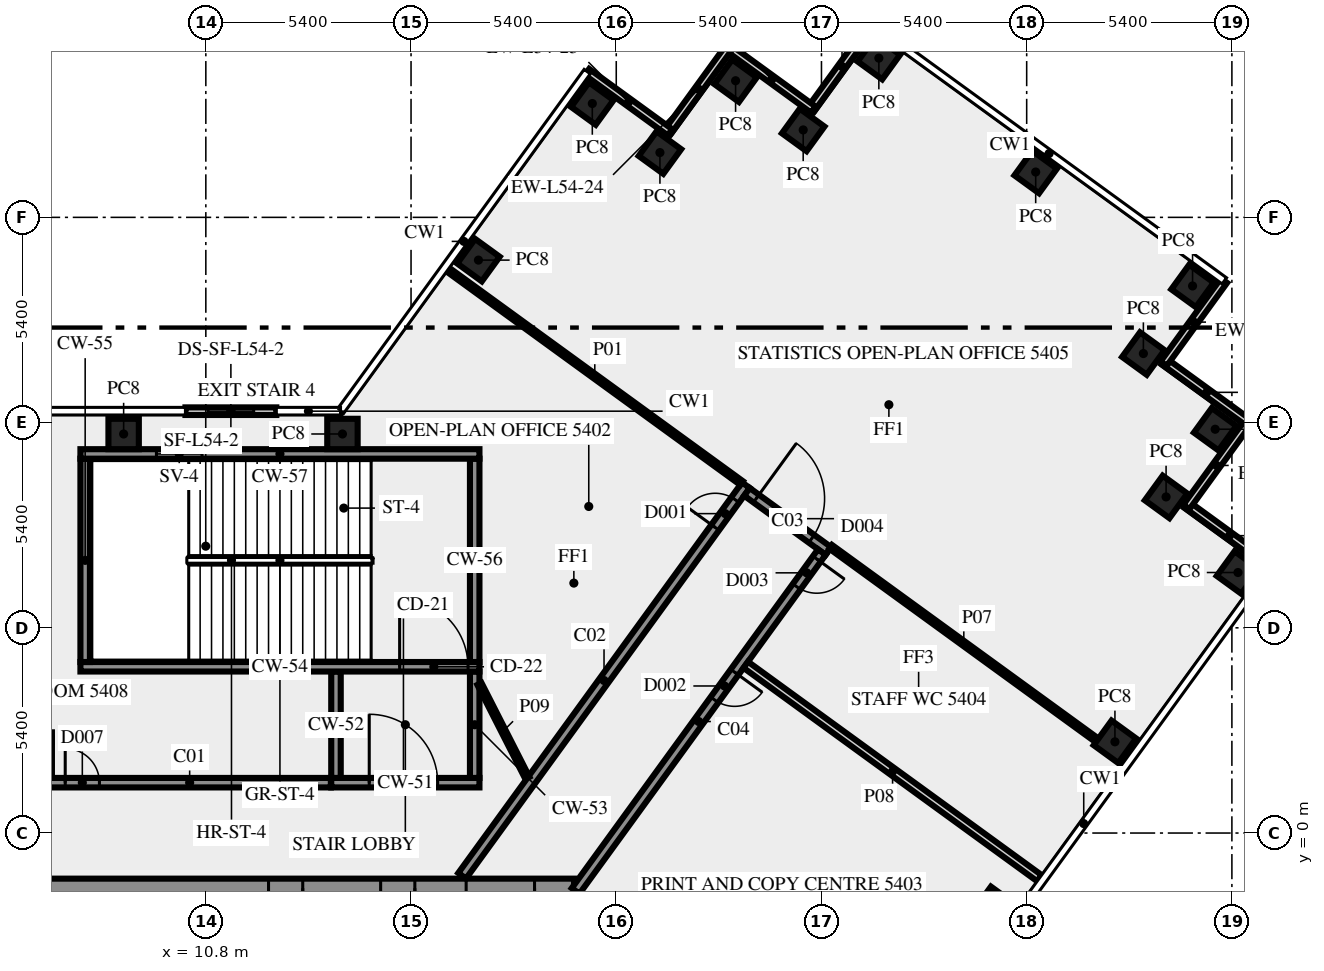
"""IFC4 building model, lengths in metres.
Left out: names, types, materials, properties, quantities, classifications, styles, units other than length and angle.
Written with IfcOpenShell. Run it as: python <this file> out.ifc"""

import sys

from ifc_helpers import new_model, si_unit, direction, frame, frame_2d, origin, origin_2d, place, context, subcontext, project, spatial, rectangle, extrude, element, fill, save


model = new_model("IFC4")
c1 = context("Model", 3, precision=1e-05, world=origin(), true_north=direction((0.0, 1.0)))
c2 = subcontext(c1, "Body", "Model", "MODEL_VIEW")
j1 = project(units=[si_unit("LENGTHUNIT", "METRE"), si_unit("PLANEANGLEUNIT", "RADIAN")], contexts=[c1])
p1 = place(None, origin())
s1 = spatial("IfcSite", under=j1, at=p1, CompositionType="ELEMENT")
p2 = place(p1, origin())
s2 = spatial("IfcBuilding", under=s1, at=p2, CompositionType="ELEMENT")
p3 = place(p2, frame((0.0, 0.0, 230.0)))
s3 = spatial("IfcBuildingStorey", under=s2, at=p3, CompositionType="ELEMENT", Elevation=230.0)
for number, where, z_axis, x_axis in (
    (1, (31.548, -1.969, 0.0), (0.0, 0.0, 1.0), (0.588, 0.809, 0.0)),
    (2, (34.722, 2.4, 0.0), (0.0, 0.0, 1.0), (0.588, 0.809, 0.0)),
    (3, (37.96, 6.855, 0.0), (0.0, 0.0, 1.0), (0.588, 0.809, 0.0)),
    (4, (36.068, 8.844, 0.0), (0.0, 0.0, 1.0), (0.588, 0.809, 0.0)),
    (5, (37.36, 10.625, 0.0), (0.0, 0.0, 1.0), (0.588, 0.809, 0.0)),
    (6, (35.471, 12.616, 0.0), (0.0, 0.0, 1.0), (-0.809, 0.588, 0.0)),
    (7, (36.765, 14.395, 0.0), (0.0, 0.0, 1.0), (-0.809, 0.588, 0.0)),
    (8, (32.637, 17.393, 0.0), (0.0, 0.0, 1.0), (-0.809, 0.588, 0.0)),
    (9, (28.51, 20.39, 0.0), (0.0, 0.0, 1.0), (-0.588, -0.809, 0.0)),
    (10, (26.519, 18.5, 0.0), (0.0, 0.0, 1.0), (-0.809, 0.588, 0.0)),
    (11, (24.74, 19.795, 0.0), (0.0, 0.0, 1.0), (-0.588, -0.809, 0.0)),
    (12, (22.749, 17.904, 0.0), (0.0, 0.0, 1.0), (-0.588, -0.809, 0.0)),
    (13, (20.97, 19.195, 0.0), (0.0, 0.0, 1.0), (-0.588, -0.809, 0.0)),
    (14, (17.974, 15.075, 0.0), (0.0, 0.0, 1.0), (-0.588, -0.809, 0.0)),
    (15, (14.395, 10.5, 0.0), (0.0, 0.0, 1.0), (-1.0, 0.0, 0.0)),
    (16, (8.637, 10.5, 0.0), (0.0, 0.0, 1.0), (-1.0, 0.0, 0.0)),
):
    element("IfcColumn", number, at=place(p3, frame(where, z_axis=z_axis, x_axis=x_axis)), inside=s3, PredefinedType="COLUMN", context=c2, shape_type="SweptSolid", body=[
        extrude(rectangle(XDim=0.8, YDim=0.8, at=origin_2d()), origin(), (0.0, 0.0, 1.0), 3.65),
    ])
for number, where, z_axis, x_axis in (
    (17, (38.829, 7.031, 0.0), (0.0, 0.0, 1.0), (-0.809, 0.588, 0.0)),
    (18, (36.602, 8.58, 0.0), (0.0, 0.0, 1.0), (0.588, 0.809, 0.0)),
    (19, (38.231, 10.802, 0.0), (0.0, 0.0, 1.0), (-0.809, 0.588, 0.0)),
    (20, (36.005, 12.352, 0.0), (0.0, 0.0, 1.0), (0.588, 0.809, 0.0)),
    (21, (28.334, 21.262, 0.0), (0.0, 0.0, 1.0), (-0.588, -0.809, 0.0)),
):
    element("IfcWall", number, at=place(p3, frame(where, z_axis=z_axis, x_axis=x_axis)), inside=s3, PredefinedType="SOLIDWALL", context=c2, shape_type="SweptSolid", body=[
        extrude(rectangle(XDim=2.7, YDim=0.2, at=frame_2d((1.35, 0.0))), origin(), (0.0, 0.0, 1.0), 3.65),
    ])
p4 = place(p3, frame((26.785, 19.036, 0.0), z_axis=(0.0, 0.0, 1.0), x_axis=(-0.809064397168, 0.587720002413, 0.0)))
e22 = element("IfcWall", 22, at=p4, inside=s3, PredefinedType="SOLIDWALL", context=c2, shape_type="SweptSolid", body=[
    extrude(rectangle(XDim=2.7, YDim=0.2, at=frame_2d((1.35, 0.0))), origin(), (0.0, 0.0, 1.0), 3.65),
])
for number, where, z_axis, x_axis in (
    (23, (24.563, 20.665, 0.0), (0.0, 0.0, 1.0), (-0.588, -0.809, 0.0)),
    (24, (23.013, 18.438, 0.0), (0.0, 0.0, 1.0), (-0.809, 0.588, 0.0)),
):
    element("IfcWall", number, at=place(p3, frame(where, z_axis=z_axis, x_axis=x_axis)), inside=s3, PredefinedType="SOLIDWALL", context=c2, shape_type="SweptSolid", body=[
        extrude(rectangle(XDim=2.7, YDim=0.2, at=frame_2d((1.35, 0.0))), origin(), (0.0, 0.0, 1.0), 3.65),
    ])
p5 = place(p3, frame((12.655, 11.1, 0.0), z_axis=(0.0, 0.0, 1.0), x_axis=(-1.0, 0.0, 0.0)))
e25 = element("IfcWall", 25, at=p5, inside=s3, PredefinedType="SOLIDWALL", context=c2, shape_type="SweptSolid", body=[
    extrude(rectangle(XDim=2.392, YDim=0.2, at=frame_2d((1.196, 0.0))), origin(), (0.0, 0.0, 1.0), 3.65),
])
p6 = place(p5, frame((0.596, 0.0, 1.0)))
e26 = element("IfcOpeningElement", 26, at=p6, cuts=e25, PredefinedType="OPENING", context=c2, shape_type="SweptSolid", body=[
    extrude(rectangle(XDim=1.2, YDim=1.2, at=frame_2d((0.6, 0.6))), frame((0.0, 0.11, 0.0), z_axis=(0.0, -1.0, 0.0), x_axis=(1.0, 0.0, 0.0)), (0.0, 0.0, 1.0), 0.22),
])
p7 = place(p3, frame((20.49, -1.45, 0.0), z_axis=(0.0, 0.0, 1.0), x_axis=(-1.0, 0.0, 0.0)))
e27 = element("IfcWall", 27, at=p7, inside=s3, PredefinedType="SHEAR", context=c2, shape_type="SweptSolid", body=[
    extrude(rectangle(XDim=40.98, YDim=0.5, at=frame_2d((20.49, 0.0))), origin(), (0.0, 0.0, 1.0), 3.65),
])
p8 = place(p7, frame((38.14, 0.0, 0.0)))
e28 = element("IfcOpeningElement", 28, at=p8, cuts=e27, PredefinedType="OPENING", context=c2, shape_type="SweptSolid", body=[
    extrude(rectangle(XDim=1.8, YDim=2.1, at=frame_2d((0.9, 1.05))), frame((0.0, 0.26, 0.0), z_axis=(0.0, -1.0, 0.0), x_axis=(1.0, 0.0, 0.0)), (0.0, 0.0, 1.0), 0.52),
])
p9 = place(p7, frame((36.728, 0.0, 0.0)))
e29 = element("IfcOpeningElement", 29, at=p9, cuts=e27, PredefinedType="OPENING", context=c2, shape_type="SweptSolid", body=[
    extrude(rectangle(XDim=0.8, YDim=2.1, at=frame_2d((0.4, 1.05))), frame((0.0, 0.26, 0.0), z_axis=(0.0, -1.0, 0.0), x_axis=(1.0, 0.0, 0.0)), (0.0, 0.0, 1.0), 0.52),
])
p10 = place(p7, frame((35.153, 0.0, 0.0)))
e30 = element("IfcOpeningElement", 30, at=p10, cuts=e27, PredefinedType="OPENING", context=c2, shape_type="SweptSolid", body=[
    extrude(rectangle(XDim=0.8, YDim=2.1, at=frame_2d((0.4, 1.05))), frame((0.0, 0.26, 0.0), z_axis=(0.0, -1.0, 0.0), x_axis=(1.0, 0.0, 0.0)), (0.0, 0.0, 1.0), 0.52),
])
p11 = place(p7, frame((32.94, 0.0, 0.0)))
e31 = element("IfcOpeningElement", 31, at=p11, cuts=e27, PredefinedType="OPENING", context=c2, shape_type="SweptSolid", body=[
    extrude(rectangle(XDim=0.9, YDim=2.1, at=frame_2d((0.45, 1.05))), frame((0.0, 0.26, 0.0), z_axis=(0.0, -1.0, 0.0), x_axis=(1.0, 0.0, 0.0)), (0.0, 0.0, 1.0), 0.52),
])
p12 = place(p7, frame((29.603, 0.0, 0.0)))
e32 = element("IfcOpeningElement", 32, at=p12, cuts=e27, PredefinedType="OPENING", context=c2, shape_type="SweptSolid", body=[
    extrude(rectangle(XDim=0.9, YDim=2.1, at=frame_2d((0.45, 1.05))), frame((0.0, 0.26, 0.0), z_axis=(0.0, -1.0, 0.0), x_axis=(1.0, 0.0, 0.0)), (0.0, 0.0, 1.0), 0.52),
])
p13 = place(p7, frame((25.877, 0.0, 0.0)))
e33 = element("IfcOpeningElement", 33, at=p13, cuts=e27, PredefinedType="OPENING", context=c2, shape_type="SweptSolid", body=[
    extrude(rectangle(XDim=0.9, YDim=2.1, at=frame_2d((0.45, 1.05))), frame((0.0, 0.26, 0.0), z_axis=(0.0, -1.0, 0.0), x_axis=(1.0, 0.0, 0.0)), (0.0, 0.0, 1.0), 0.52),
])
p14 = place(p7, frame((19.59, 0.0, 0.0)))
e34 = element("IfcOpeningElement", 34, at=p14, cuts=e27, PredefinedType="OPENING", context=c2, shape_type="SweptSolid", body=[
    extrude(rectangle(XDim=2.0, YDim=2.1, at=frame_2d((1.0, 1.05))), frame((0.0, 0.26, 0.0), z_axis=(0.0, -1.0, 0.0), x_axis=(1.0, 0.0, 0.0)), (0.0, 0.0, 1.0), 0.52),
])
p15 = place(p7, frame((7.14, 0.0, 0.0)))
e35 = element("IfcOpeningElement", 35, at=p15, cuts=e27, PredefinedType="OPENING", context=c2, shape_type="SweptSolid", body=[
    extrude(rectangle(XDim=0.9, YDim=2.1, at=frame_2d((0.45, 1.05))), frame((0.0, 0.26, 0.0), z_axis=(0.0, -1.0, 0.0), x_axis=(1.0, 0.0, 0.0)), (0.0, 0.0, 1.0), 0.52),
])
p16 = place(p7, frame((4.19, 0.0, 0.0)))
e36 = element("IfcOpeningElement", 36, at=p16, cuts=e27, PredefinedType="OPENING", context=c2, shape_type="SweptSolid", body=[
    extrude(rectangle(XDim=0.9, YDim=2.1, at=frame_2d((0.45, 1.05))), frame((0.0, 0.26, 0.0), z_axis=(0.0, -1.0, 0.0), x_axis=(1.0, 0.0, 0.0)), (0.0, 0.0, 1.0), 0.52),
])
p17 = place(p7, frame((1.04, 0.0, 0.0)))
e37 = element("IfcOpeningElement", 37, at=p17, cuts=e27, PredefinedType="OPENING", context=c2, shape_type="SweptSolid", body=[
    extrude(rectangle(XDim=1.8, YDim=2.1, at=frame_2d((0.9, 1.05))), frame((0.0, 0.26, 0.0), z_axis=(0.0, -1.0, 0.0), x_axis=(1.0, 0.0, 0.0)), (0.0, 0.0, 1.0), 0.52),
])
p18 = place(p3, frame((14.1, 1.325, 0.0), z_axis=(0.0, 0.0, 1.0), x_axis=(1.0, 0.0, 0.0)))
e38 = element("IfcWall", 38, at=p18, inside=s3, PredefinedType="SHEAR", context=c2, shape_type="SweptSolid", body=[
    extrude(rectangle(XDim=3.9, YDim=0.25, at=frame_2d((1.95, 0.0))), origin(), (0.0, 0.0, 1.0), 3.65),
])
p19 = place(p18, frame((1.0, 0.0, 0.0)))
e39 = element("IfcOpeningElement", 39, at=p19, cuts=e38, PredefinedType="OPENING", context=c2, shape_type="SweptSolid", body=[
    extrude(rectangle(XDim=1.8, YDim=2.1, at=frame_2d((0.9, 1.05))), frame((0.0, 0.135, 0.0), z_axis=(0.0, -1.0, 0.0), x_axis=(1.0, 0.0, 0.0)), (0.0, 0.0, 1.0), 0.27),
])
for number, where, z_axis, x_axis in (
    (40, (14.225, 1.45, 0.0), (0.0, 0.0, 1.0), (0.0, 1.0, 0.0)),
    (41, (17.875, 1.45, 0.0), (0.0, 0.0, 1.0), (0.0, 1.0, 0.0)),
):
    element("IfcWall", number, at=place(p3, frame(where, z_axis=z_axis, x_axis=x_axis)), inside=s3, PredefinedType="SHEAR", context=c2, shape_type="SweptSolid", body=[
        extrude(rectangle(XDim=2.8, YDim=0.25, at=frame_2d((1.4, 0.0))), origin(), (0.0, 0.0, 1.0), 3.65),
    ])
p20 = place(p3, frame((7.5, 4.375, 0.0), z_axis=(0.0, 0.0, 1.0), x_axis=(1.0, 0.0, 0.0)))
e42 = element("IfcWall", 42, at=p20, inside=s3, PredefinedType="SHEAR", context=c2, shape_type="SweptSolid", body=[
    extrude(rectangle(XDim=10.5, YDim=0.25, at=frame_2d((5.25, 0.0))), origin(), (0.0, 0.0, 1.0), 3.65),
])
p21 = place(p20, frame((8.4, 0.0, 0.0)))
e43 = element("IfcOpeningElement", 43, at=p21, cuts=e42, PredefinedType="OPENING", context=c2, shape_type="SweptSolid", body=[
    extrude(rectangle(XDim=1.8, YDim=2.1, at=frame_2d((0.9, 1.05))), frame((0.0, 0.135, 0.0), z_axis=(0.0, -1.0, 0.0), x_axis=(1.0, 0.0, 0.0)), (0.0, 0.0, 1.0), 0.27),
])
for number, where, z_axis, x_axis in (
    (44, (7.625, 4.5, 0.0), (0.0, 0.0, 1.0), (0.0, 1.0, 0.0)),
    (45, (17.875, 4.5, 0.0), (0.0, 0.0, 1.0), (0.0, 1.0, 0.0)),
):
    element("IfcWall", number, at=place(p3, frame(where, z_axis=z_axis, x_axis=x_axis)), inside=s3, PredefinedType="SHEAR", context=c2, shape_type="SweptSolid", body=[
        extrude(rectangle(XDim=5.35, YDim=0.25, at=frame_2d((2.675, 0.0))), origin(), (0.0, 0.0, 1.0), 3.65),
    ])
p22 = place(p3, frame((7.5, 9.975, 0.0), z_axis=(0.0, 0.0, 1.0), x_axis=(1.0, 0.0, 0.0)))
e46 = element("IfcWall", 46, at=p22, inside=s3, PredefinedType="SHEAR", context=c2, shape_type="SweptSolid", body=[
    extrude(rectangle(XDim=10.5, YDim=0.25, at=frame_2d((5.25, 0.0))), origin(), (0.0, 0.0, 1.0), 3.65),
])
p23 = place(p22, frame((2.0, 0.0, 1.0)))
e47 = element("IfcOpeningElement", 47, at=p23, cuts=e46, PredefinedType="OPENING", context=c2, shape_type="SweptSolid", body=[
    extrude(rectangle(XDim=1.2, YDim=1.2, at=frame_2d((0.6, 0.6))), frame((0.0, 0.135, 0.0), z_axis=(0.0, -1.0, 0.0), x_axis=(1.0, 0.0, 0.0)), (0.0, 0.0, 1.0), 0.27),
])
p24 = place(p3, frame((6.659, 1.325, 0.0), z_axis=(0.0, 0.0, 1.0), x_axis=(1.0, 0.0, 0.0)))
e48 = element("IfcWall", 48, at=p24, inside=s3, PredefinedType="SOLIDWALL", context=c2, shape_type="SweptSolid", body=[
    extrude(rectangle(XDim=7.431, YDim=0.25, at=frame_2d((3.716, 0.0))), origin(), (0.0, 0.0, 1.0), 3.65),
])
p25 = place(p24, frame((0.441, 0.0, 0.0)))
e49 = element("IfcOpeningElement", 49, at=p25, cuts=e48, PredefinedType="OPENING", context=c2, shape_type="SweptSolid", body=[
    extrude(rectangle(XDim=0.9, YDim=2.1, at=frame_2d((0.45, 1.05))), frame((0.0, 0.135, 0.0), z_axis=(0.0, -1.0, 0.0), x_axis=(1.0, 0.0, 0.0)), (0.0, 0.0, 1.0), 0.27),
])
p26 = place(p3, frame((17.545, -1.125, 0.0), z_axis=(0.0, 0.0, 1.0), x_axis=(0.587796810203, 0.809008596935, 0.0)))
e50 = element("IfcWall", 50, at=p26, inside=s3, PredefinedType="SOLIDWALL", context=c2, shape_type="SweptSolid", body=[
    extrude(rectangle(XDim=12.703, YDim=0.25, at=frame_2d((6.352, 0.0))), origin(), (0.0, 0.0, 1.0), 3.65),
])
p27 = place(p26, frame((11.329, 0.0, 0.0)))
e51 = element("IfcOpeningElement", 51, at=p27, cuts=e50, PredefinedType="OPENING", context=c2, shape_type="SweptSolid", body=[
    extrude(rectangle(XDim=0.9, YDim=2.1, at=frame_2d((0.45, 1.05))), frame((0.0, 0.135, 0.0), z_axis=(0.0, -1.0, 0.0), x_axis=(1.0, 0.0, 0.0)), (0.0, 0.0, 1.0), 0.27),
])
p28 = place(p3, frame((25.039, 8.978, 0.0), z_axis=(0.0, 0.0, 1.0), x_axis=(0.809006914995, -0.587799125119, 0.0)))
e52 = element("IfcWall", 52, at=p28, inside=s3, PredefinedType="SOLIDWALL", context=c2, shape_type="SweptSolid", body=[
    extrude(rectangle(XDim=2.65, YDim=0.25, at=frame_2d((1.325, 0.0))), origin(), (0.0, 0.0, 1.0), 3.65),
])
p29 = place(p28, frame((0.301, 0.0, 0.0)))
e53 = element("IfcOpeningElement", 53, at=p29, cuts=e52, PredefinedType="OPENING", context=c2, shape_type="SweptSolid", body=[
    extrude(rectangle(XDim=1.8, YDim=2.1, at=frame_2d((0.9, 1.05))), frame((0.0, 0.135, 0.0), z_axis=(0.0, -1.0, 0.0), x_axis=(1.0, 0.0, 0.0)), (0.0, 0.0, 1.0), 0.27),
])
p30 = place(p3, frame((27.009, 7.392, 0.0), z_axis=(0.0, 0.0, 1.0), x_axis=(-0.587776457057, -0.809023384414, 0.0)))
e54 = element("IfcWall", 54, at=p30, inside=s3, PredefinedType="SOLIDWALL", context=c2, shape_type="SweptSolid", body=[
    extrude(rectangle(XDim=11.021, YDim=0.25, at=frame_2d((5.51, 0.0))), origin(), (0.0, 0.0, 1.0), 3.65),
])
p31 = place(p30, frame((3.905, 0.0, 0.0)))
e55 = element("IfcOpeningElement", 55, at=p31, cuts=e54, PredefinedType="OPENING", context=c2, shape_type="SweptSolid", body=[
    extrude(rectangle(XDim=0.9, YDim=2.1, at=frame_2d((0.45, 1.05))), frame((0.0, 0.135, 0.0), z_axis=(0.0, -1.0, 0.0), x_axis=(1.0, 0.0, 0.0)), (0.0, 0.0, 1.0), 0.27),
])
p32 = place(p30, frame((0.225, 0.0, 0.0)))
e56 = element("IfcOpeningElement", 56, at=p32, cuts=e54, PredefinedType="OPENING", context=c2, shape_type="SweptSolid", body=[
    extrude(rectangle(XDim=0.9, YDim=2.1, at=frame_2d((0.45, 1.05))), frame((0.0, 0.135, 0.0), z_axis=(0.0, -1.0, 0.0), x_axis=(1.0, 0.0, 0.0)), (0.0, 0.0, 1.0), 0.27),
])
p33 = place(p3, frame((24.898, 9.209, 0.0), z_axis=(0.0, 0.0, 1.0), x_axis=(-0.809013490065, 0.587790075531, 0.0)))
e57 = element("IfcWall", 57, at=p33, inside=s3, PredefinedType="PARTITIONING", context=c2, shape_type="SweptSolid", body=[
    extrude(rectangle(XDim=9.549, YDim=0.12, at=frame_2d((4.775, 0.0))), origin(), (0.0, 0.0, 1.0), 2.85),
])
p34 = place(p3, frame((27.24, 7.532, 0.0), z_axis=(0.0, 0.0, 1.0), x_axis=(0.809033281668, -0.587762834103, 0.0)))
e58 = element("IfcWall", 58, at=p34, inside=s3, PredefinedType="PARTITIONING", context=c2, shape_type="SweptSolid", body=[
    extrude(rectangle(XDim=8.665, YDim=0.12, at=frame_2d((4.333, 0.0))), origin(), (0.0, 0.0, 1.0), 3.65),
])
p35 = place(p3, frame((32.734, -1.187, 0.0), z_axis=(0.0, 0.0, 1.0), x_axis=(-0.808994684961, 0.587815957341, 0.0)))
e59 = element("IfcWall", 59, at=p35, inside=s3, PredefinedType="SOLIDWALL", context=c2, shape_type="SweptSolid", body=[
    extrude(rectangle(XDim=9.55, YDim=0.2, at=frame_2d((4.775, 0.0))), origin(), (0.0, 0.0, 1.0), 2.85),
])
p36 = place(p3, frame((18.0, 3.925, 0.0), z_axis=(0.0, 0.0, 1.0), x_axis=(0.453950796792, -0.891026752736, 0.0)))
e60 = element("IfcWall", 60, at=p36, inside=s3, PredefinedType="PARTITIONING", context=c2, shape_type="SweptSolid", body=[
    extrude(rectangle(XDim=2.778, YDim=0.12, at=frame_2d((1.389, 0.0))), origin(), (0.0, 0.0, 1.0), 3.65),
])
p37 = place(p6, origin())
e61 = element("IfcWindow", 61, at=p37, inside=s3, PartitioningType="SINGLE_PANEL", PredefinedType="WINDOW", context=c2, shape_type="SweptSolid", body=[
    extrude(rectangle(XDim=1.2, YDim=1.2, at=frame_2d((0.6, 0.6))), frame((0.0, 0.03, 0.0), z_axis=(0.0, -1.0, 0.0), x_axis=(1.0, 0.0, 0.0)), (0.0, 0.0, 1.0), 0.06),
])
fill(e26, e61)
p38 = place(p15, origin())
e62 = element("IfcDoor", 62, at=p38, inside=s3, OperationType="SINGLE_SWING_LEFT", PredefinedType="DOOR", context=c2, shape_type="SweptSolid", body=[
    extrude(rectangle(XDim=0.9, YDim=2.1, at=frame_2d((0.45, 1.05))), frame((0.0, 0.025, 0.0), z_axis=(0.0, -1.0, 0.0), x_axis=(1.0, 0.0, 0.0)), (0.0, 0.0, 1.0), 0.05),
])
fill(e35, e62)
p39 = place(p16, origin())
e63 = element("IfcDoor", 63, at=p39, inside=s3, OperationType="SINGLE_SWING_LEFT", PredefinedType="DOOR", context=c2, shape_type="SweptSolid", body=[
    extrude(rectangle(XDim=0.9, YDim=2.1, at=frame_2d((0.45, 1.05))), frame((0.0, 0.025, 0.0), z_axis=(0.0, -1.0, 0.0), x_axis=(1.0, 0.0, 0.0)), (0.0, 0.0, 1.0), 0.05),
])
fill(e36, e63)
p40 = place(p17, origin())
e64 = element("IfcDoor", 64, at=p40, inside=s3, OperationType="DOUBLE_DOOR_SINGLE_SWING", PredefinedType="DOOR", context=c2, shape_type="SweptSolid", body=[
    extrude(rectangle(XDim=1.8, YDim=2.1, at=frame_2d((0.9, 1.05))), frame((0.0, 0.025, 0.0), z_axis=(0.0, -1.0, 0.0), x_axis=(1.0, 0.0, 0.0)), (0.0, 0.0, 1.0), 0.05),
])
fill(e37, e64)
p41 = place(p19, origin())
e65 = element("IfcDoor", 65, at=p41, inside=s3, OperationType="DOUBLE_DOOR_SINGLE_SWING", PredefinedType="DOOR", context=c2, shape_type="SweptSolid", body=[
    extrude(rectangle(XDim=1.8, YDim=2.1, at=frame_2d((0.9, 1.05))), frame((0.0, 0.025, 0.0), z_axis=(0.0, -1.0, 0.0), x_axis=(1.0, 0.0, 0.0)), (0.0, 0.0, 1.0), 0.05),
])
fill(e39, e65)
p42 = place(p21, origin())
e66 = element("IfcDoor", 66, at=p42, inside=s3, OperationType="DOUBLE_DOOR_SINGLE_SWING", PredefinedType="DOOR", context=c2, shape_type="SweptSolid", body=[
    extrude(rectangle(XDim=1.8, YDim=2.1, at=frame_2d((0.9, 1.05))), frame((0.0, 0.025, 0.0), z_axis=(0.0, -1.0, 0.0), x_axis=(1.0, 0.0, 0.0)), (0.0, 0.0, 1.0), 0.05),
])
fill(e43, e66)
p43 = place(p23, origin())
e67 = element("IfcWindow", 67, at=p43, inside=s3, PartitioningType="SINGLE_PANEL", PredefinedType="WINDOW", context=c2, shape_type="SweptSolid", body=[
    extrude(rectangle(XDim=1.2, YDim=1.2, at=frame_2d((0.6, 0.6))), frame((0.0, 0.03, 0.0), z_axis=(0.0, -1.0, 0.0), x_axis=(1.0, 0.0, 0.0)), (0.0, 0.0, 1.0), 0.06),
])
fill(e47, e67)
p44 = place(p27, origin())
e68 = element("IfcDoor", 68, at=p44, inside=s3, OperationType="SINGLE_SWING_RIGHT", PredefinedType="DOOR", context=c2, shape_type="SweptSolid", body=[
    extrude(rectangle(XDim=0.9, YDim=2.1, at=frame_2d((0.45, 1.05))), frame((0.0, 0.025, 0.0), z_axis=(0.0, -1.0, 0.0), x_axis=(1.0, 0.0, 0.0)), (0.0, 0.0, 1.0), 0.05),
])
fill(e51, e68)
p45 = place(p25, origin())
e69 = element("IfcDoor", 69, at=p45, inside=s3, OperationType="SINGLE_SWING_LEFT", PredefinedType="DOOR", context=c2, shape_type="SweptSolid", body=[
    extrude(rectangle(XDim=0.9, YDim=2.1, at=frame_2d((0.45, 1.05))), frame((0.0, 0.025, 0.0), z_axis=(0.0, -1.0, 0.0), x_axis=(1.0, 0.0, 0.0)), (0.0, 0.0, 1.0), 0.05),
])
fill(e49, e69)
p46 = place(p29, origin())
e70 = element("IfcDoor", 70, at=p46, inside=s3, OperationType="DOUBLE_DOOR_SINGLE_SWING", PredefinedType="DOOR", context=c2, shape_type="SweptSolid", body=[
    extrude(rectangle(XDim=1.8, YDim=2.1, at=frame_2d((0.9, 1.05))), frame((0.0, 0.025, 0.0), z_axis=(0.0, -1.0, 0.0), x_axis=(1.0, 0.0, 0.0)), (0.0, 0.0, 1.0), 0.05),
])
fill(e53, e70)
p47 = place(p31, origin())
e71 = element("IfcDoor", 71, at=p47, inside=s3, OperationType="SINGLE_SWING_LEFT", PredefinedType="DOOR", context=c2, shape_type="SweptSolid", body=[
    extrude(rectangle(XDim=0.9, YDim=2.1, at=frame_2d((0.45, 1.05))), frame((0.0, 0.025, 0.0), z_axis=(0.0, -1.0, 0.0), x_axis=(1.0, 0.0, 0.0)), (0.0, 0.0, 1.0), 0.05),
])
fill(e55, e71)
p48 = place(p32, origin())
e72 = element("IfcDoor", 72, at=p48, inside=s3, OperationType="SINGLE_SWING_LEFT", PredefinedType="DOOR", context=c2, shape_type="SweptSolid", body=[
    extrude(rectangle(XDim=0.9, YDim=2.1, at=frame_2d((0.45, 1.05))), frame((0.0, 0.025, 0.0), z_axis=(0.0, -1.0, 0.0), x_axis=(1.0, 0.0, 0.0)), (0.0, 0.0, 1.0), 0.05),
])
fill(e56, e72)
save(model, sys.argv[1])
